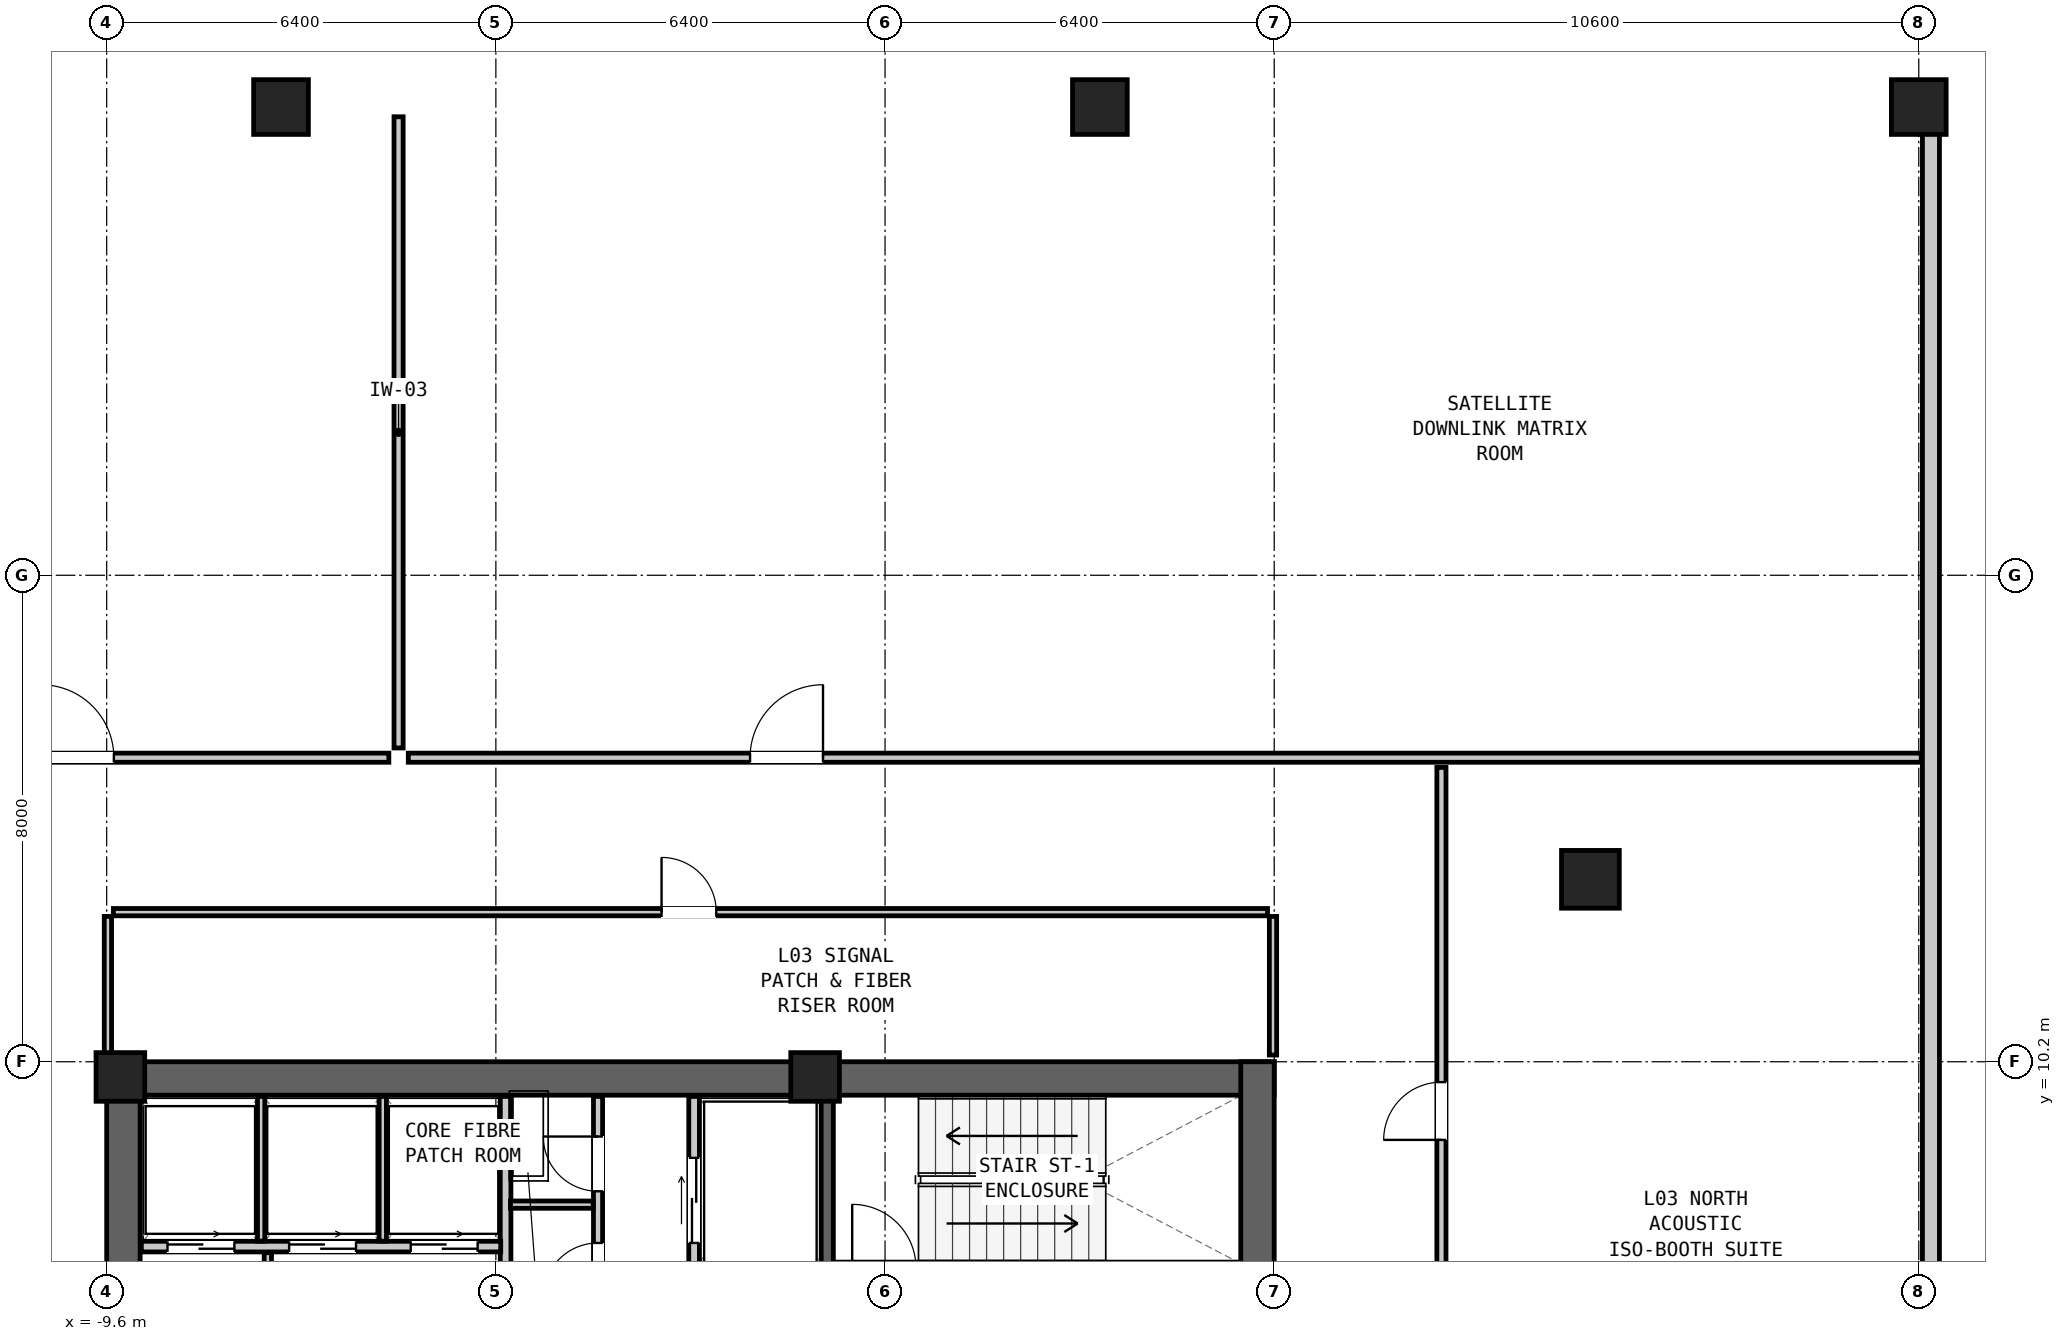
"""IFC4 building model, lengths in metres.
Left out: names, types, materials, properties, quantities, classifications, styles, units other than length and angle.
Written with IfcOpenShell. Run it as: python <this file> out.ifc"""

import sys

from ifc_helpers import new_model, si_unit, direction, frame, frame_2d, origin, origin_2d, place, context, subcontext, project, spatial, rectangle, hollow_rectangle, extrude, element, fill, save


model = new_model("IFC4")
c1 = context("Model", 3, precision=1e-05, world=origin(), true_north=direction((0.0, 1.0)))
c2 = subcontext(c1, "Body", "Model", "MODEL_VIEW")
j1 = project(units=[si_unit("LENGTHUNIT", "METRE"), si_unit("PLANEANGLEUNIT", "RADIAN")], contexts=[c1])
p1 = place(None, origin())
s1 = spatial("IfcSite", under=j1, at=p1, CompositionType="ELEMENT")
p2 = place(p1, origin())
s2 = spatial("IfcBuilding", under=s1, at=p2, CompositionType="ELEMENT")
p3 = place(p2, frame((0.0, 0.0, 13.5)))
s3 = spatial("IfcBuildingStorey", under=s2, at=p3, CompositionType="ELEMENT", Elevation=13.5)
p4 = place(p3, frame((-9.6, 9.925, 0.0), z_axis=(0.0, 0.0, 1.0), x_axis=(1.0, 0.0, 0.0)))
e1 = element("IfcWall", 1, at=p4, inside=s3, PredefinedType="SHEAR", context=c2, shape_type="SweptSolid", body=[
    extrude(rectangle(XDim=19.2, YDim=0.55, at=frame_2d((9.6, 0.0))), origin(), (0.0, 0.0, 1.0), 4.2),
])
for number, where, z_axis, x_axis in (
    (2, (-9.325, 3.6, 0.0), (0.0, 0.0, 1.0), (0.0, 1.0, 0.0)),
    (3, (9.325, 3.6, 0.0), (0.0, 0.0, 1.0), (0.0, 1.0, 0.0)),
):
    element("IfcWall", number, at=place(p3, frame(where, z_axis=z_axis, x_axis=x_axis)), inside=s3, PredefinedType="SHEAR", context=c2, shape_type="SweptSolid", body=[
        extrude(rectangle(XDim=6.6, YDim=0.55, at=frame_2d((3.3, 0.0))), origin(), (0.0, 0.0, 1.0), 4.2),
    ])
p5 = place(p3, frame((14.8, 13.2, 0.0), z_axis=(0.0, 0.0, 1.0), x_axis=(1.0, 0.0, 0.0)))
e4 = element("IfcColumn", 4, at=p5, inside=s3, PredefinedType="COLUMN", context=c2, shape_type="SweptSolid", body=[
    extrude(hollow_rectangle(XDim=0.95, YDim=0.95, WallThickness=0.06, at=origin_2d()), origin(), (0.0, 0.0, 1.0), 4.2),
])
for number, where, z_axis, x_axis in (
    (5, (20.2, 25.9, 0.0), (0.0, 0.0, 1.0), (1.0, 0.0, 0.0)),
    (6, (6.733, 25.9, 0.0), (0.0, 0.0, 1.0), (1.0, 0.0, 0.0)),
    (7, (-6.733, 25.9, 0.0), (0.0, 0.0, 1.0), (1.0, 0.0, 0.0)),
):
    element("IfcColumn", number, at=place(p3, frame(where, z_axis=z_axis, x_axis=x_axis)), inside=s3, PredefinedType="COLUMN", context=c2, shape_type="SweptSolid", body=[
        extrude(hollow_rectangle(XDim=0.9, YDim=0.9, WallThickness=0.055, at=origin_2d()), origin(), (0.0, 0.0, 1.0), 4.2),
    ])
for number, where, z_axis, x_axis in (
    (8, (-9.375, 9.95, 0.0), (0.0, 0.0, 1.0), (1.0, 0.0, 0.0)),
    (9, (2.05, 9.95, 0.0), (0.0, 0.0, 1.0), (1.0, 0.0, 0.0)),
):
    element("IfcColumn", number, at=place(p3, frame(where, z_axis=z_axis, x_axis=x_axis)), inside=s3, PredefinedType="COLUMN", context=c2, shape_type="SweptSolid", body=[
        extrude(rectangle(XDim=0.8, YDim=0.8, at=origin_2d()), origin(), (0.0, 0.0, 1.0), 4.2),
    ])
p6 = place(p3, frame((2.25, 4.17, 0.0), z_axis=(0.0, 0.0, 1.0), x_axis=(0.0, 1.0, 0.0)))
e10 = element("IfcWall", 10, at=p6, inside=s3, PredefinedType="SHEAR", context=c2, shape_type="SweptSolid", body=[
    extrude(rectangle(XDim=5.46, YDim=0.2, at=frame_2d((2.73, 0.0))), origin(), (0.0, 0.0, 1.0), 3.88),
])
p7 = place(p6, frame((0.65, 0.0, 0.0)))
e11 = element("IfcOpeningElement", 11, at=p7, cuts=e10, PredefinedType="OPENING", context=c2, shape_type="SweptSolid", body=[
    extrude(rectangle(XDim=1.15, YDim=2.08, at=frame_2d((0.575, 1.04))), frame((0.0, 0.112, 0.0), z_axis=(0.0, -1.0, 0.0), x_axis=(1.0, 0.0, 0.0)), (0.0, 0.0, 1.0), 0.224),
])
p8 = place(p3, frame((0.06, 4.17, 0.0), z_axis=(0.0, 0.0, 1.0), x_axis=(0.0, 1.0, 0.0)))
e12 = element("IfcWall", 12, at=p8, inside=s3, PredefinedType="PARTITIONING", context=c2, shape_type="SweptSolid", body=[
    extrude(rectangle(XDim=5.46, YDim=0.175, at=frame_2d((2.73, 0.0))), origin(), (0.0, 0.0, 1.0), 3.88),
])
p9 = place(p8, frame((3.05, 0.0, 0.0)))
e13 = element("IfcOpeningElement", 13, at=p9, cuts=e12, PredefinedType="OPENING", context=c2, shape_type="SweptSolid", body=[
    extrude(rectangle(XDim=1.4, YDim=2.12, at=frame_2d((0.7, 1.06))), frame((0.0, 0.1, 0.0), z_axis=(0.0, -1.0, 0.0), x_axis=(1.0, 0.0, 0.0)), (0.0, 0.0, 1.0), 0.199),
])
p10 = place(p3, frame((-3.04, 4.17, 0.0), z_axis=(0.0, 0.0, 1.0), x_axis=(0.0, 1.0, 0.0)))
e14 = element("IfcWall", 14, at=p10, inside=s3, PredefinedType="PARTITIONING", context=c2, shape_type="SweptSolid", body=[
    extrude(rectangle(XDim=5.46, YDim=0.175, at=frame_2d((2.73, 0.0))), origin(), (0.0, 0.0, 1.0), 3.88),
])
p11 = place(p3, frame((-1.52, 4.17, 0.0), z_axis=(0.0, 0.0, 1.0), x_axis=(0.0, 1.0, 0.0)))
e15 = element("IfcWall", 15, at=p11, inside=s3, PredefinedType="PARTITIONING", context=c2, shape_type="SweptSolid", body=[
    extrude(rectangle(XDim=5.46, YDim=0.15, at=frame_2d((2.73, 0.0))), origin(), (0.0, 0.0, 1.0), 3.88),
])
p12 = place(p11, frame((3.9, 0.0, 0.0)))
e16 = element("IfcOpeningElement", 16, at=p12, cuts=e15, PredefinedType="OPENING", context=c2, shape_type="SweptSolid", body=[
    extrude(rectangle(XDim=0.9, YDim=2.05, at=frame_2d((0.45, 1.025))), frame((0.0, 0.087, 0.0), z_axis=(0.0, -1.0, 0.0), x_axis=(1.0, 0.0, 0.0)), (0.0, 0.0, 1.0), 0.174),
])
p13 = place(p11, frame((2.15, 0.0, 0.0)))
e17 = element("IfcOpeningElement", 17, at=p13, cuts=e15, PredefinedType="OPENING", context=c2, shape_type="SweptSolid", body=[
    extrude(rectangle(XDim=0.9, YDim=2.05, at=frame_2d((0.45, 1.025))), frame((0.0, 0.087, 0.0), z_axis=(0.0, -1.0, 0.0), x_axis=(1.0, 0.0, 0.0)), (0.0, 0.0, 1.0), 0.174),
])
p14 = place(p11, frame((0.35, 0.0, 0.0)))
e18 = element("IfcOpeningElement", 18, at=p14, cuts=e15, PredefinedType="OPENING", context=c2, shape_type="SweptSolid", body=[
    extrude(rectangle(XDim=0.92, YDim=2.1, at=frame_2d((0.46, 1.05))), frame((0.0, 0.087, 0.0), z_axis=(0.0, -1.0, 0.0), x_axis=(1.0, 0.0, 0.0)), (0.0, 0.0, 1.0), 0.174),
])
p15 = place(p3, frame((-2.96, 7.85, 0.0), z_axis=(0.0, 0.0, 1.0), x_axis=(1.0, 0.0, 0.0)))
e19 = element("IfcWall", 19, at=p15, inside=s3, PredefinedType="PARTITIONING", context=c2, shape_type="SweptSolid", body=[
    extrude(rectangle(XDim=1.36, YDim=0.12, at=frame_2d((0.68, 0.0))), origin(), (0.0, 0.0, 1.0), 3.88),
])
p16 = place(p3, frame((-9.03, 7.16, 0.0), z_axis=(0.0, 0.0, 1.0), x_axis=(1.0, 0.0, 0.0)))
e20 = element("IfcWall", 20, at=p16, inside=s3, PredefinedType="PARTITIONING", context=c2, shape_type="SweptSolid", body=[
    extrude(rectangle(XDim=5.91, YDim=0.175, at=frame_2d((2.955, 0.0))), origin(), (0.0, 0.0, 1.0), 3.88),
])
p17 = place(p16, frame((0.43, 0.0, 0.0)))
e21 = element("IfcOpeningElement", 21, at=p17, cuts=e20, PredefinedType="OPENING", context=c2, shape_type="SweptSolid", body=[
    extrude(rectangle(XDim=1.1, YDim=2.06, at=frame_2d((0.55, 1.03))), frame((0.0, 0.1, 0.0), z_axis=(0.0, -1.0, 0.0), x_axis=(1.0, 0.0, 0.0)), (0.0, 0.0, 1.0), 0.199),
])
p18 = place(p16, frame((2.43, 0.0, 0.0)))
e22 = element("IfcOpeningElement", 22, at=p18, cuts=e20, PredefinedType="OPENING", context=c2, shape_type="SweptSolid", body=[
    extrude(rectangle(XDim=1.1, YDim=2.06, at=frame_2d((0.55, 1.03))), frame((0.0, 0.1, 0.0), z_axis=(0.0, -1.0, 0.0), x_axis=(1.0, 0.0, 0.0)), (0.0, 0.0, 1.0), 0.199),
])
p19 = place(p16, frame((4.43, 0.0, 0.0)))
e23 = element("IfcOpeningElement", 23, at=p19, cuts=e20, PredefinedType="OPENING", context=c2, shape_type="SweptSolid", body=[
    extrude(rectangle(XDim=1.1, YDim=2.06, at=frame_2d((0.55, 1.03))), frame((0.0, 0.1, 0.0), z_axis=(0.0, -1.0, 0.0), x_axis=(1.0, 0.0, 0.0)), (0.0, 0.0, 1.0), 0.199),
])
for number, where, z_axis, x_axis in (
    (24, (-7.06, 7.25, 0.0), (0.0, 0.0, 1.0), (0.0, 1.0, 0.0)),
    (25, (-5.06, 7.25, 0.0), (0.0, 0.0, 1.0), (0.0, 1.0, 0.0)),
):
    element("IfcWall", number, at=place(p3, frame(where, z_axis=z_axis, x_axis=x_axis)), inside=s3, PredefinedType="PARTITIONING", context=c2, shape_type="SweptSolid", body=[
        extrude(rectangle(XDim=2.38, YDim=0.12, at=frame_2d((1.19, 0.0))), origin(), (0.0, 0.0, 1.0), 3.88),
    ])
p20 = place(p3, frame((-6.95, 4.17, 0.0), z_axis=(0.0, 0.0, 1.0), x_axis=(0.0, 1.0, 0.0)))
e26 = element("IfcWall", 26, at=p20, inside=s3, PredefinedType="PARTITIONING", context=c2, shape_type="SweptSolid", body=[
    extrude(rectangle(XDim=2.89, YDim=0.12, at=frame_2d((1.445, 0.0))), origin(), (0.0, 0.0, 1.0), 3.88),
])
p21 = place(p3, frame((20.4, -25.74, 0.0), z_axis=(0.0, 0.0, 1.0), x_axis=(0.0, 1.0, 0.0)))
e27 = element("IfcWall", 27, at=p21, inside=s3, PredefinedType="MOVABLE", context=c2, shape_type="SweptSolid", body=[
    extrude(rectangle(XDim=51.48, YDim=0.28, at=frame_2d((25.74, 0.0))), origin(), (0.0, 0.0, 1.0), 3.253),
])
p22 = place(p21, frame((25.255, 0.0, 0.0)))
e28 = element("IfcOpeningElement", 28, at=p22, cuts=e27, PredefinedType="OPENING", context=c2, shape_type="SweptSolid", body=[
    extrude(rectangle(XDim=2.0, YDim=2.14, at=frame_2d((1.0, 1.07))), frame((0.0, 0.152, 0.0), z_axis=(0.0, -1.0, 0.0), x_axis=(1.0, 0.0, 0.0)), (0.0, 0.0, 1.0), 0.304),
])
p23 = place(p3, frame((-28.24, 15.2, 0.0), z_axis=(0.0, 0.0, 1.0), x_axis=(1.0, 0.0, 0.0)))
e29 = element("IfcWall", 29, at=p23, inside=s3, PredefinedType="PARTITIONING", context=c2, shape_type="SweptSolid", body=[
    extrude(rectangle(XDim=23.28, YDim=0.15, at=frame_2d((11.64, 0.0))), origin(), (0.0, 0.0, 1.0), 3.88),
])
p24 = place(p23, frame((17.558, 0.0, 0.0)))
e30 = element("IfcOpeningElement", 30, at=p24, cuts=e29, PredefinedType="OPENING", context=c2, shape_type="SweptSolid", body=[
    extrude(rectangle(XDim=1.2, YDim=2.1, at=frame_2d((0.6, 1.05))), frame((0.0, 0.087, 0.0), z_axis=(0.0, -1.0, 0.0), x_axis=(1.0, 0.0, 0.0)), (0.0, 0.0, 1.0), 0.174),
])
p25 = place(p3, frame((-4.64, 15.2, 0.0), z_axis=(0.0, 0.0, 1.0), x_axis=(1.0, 0.0, 0.0)))
e31 = element("IfcWall", 31, at=p25, inside=s3, PredefinedType="PARTITIONING", context=c2, shape_type="SweptSolid", body=[
    extrude(rectangle(XDim=24.88, YDim=0.15, at=frame_2d((12.44, 0.0))), origin(), (0.0, 0.0, 1.0), 3.88),
])
p26 = place(p25, frame((5.62, 0.0, 0.0)))
e32 = element("IfcOpeningElement", 32, at=p26, cuts=e31, PredefinedType="OPENING", context=c2, shape_type="SweptSolid", body=[
    extrude(rectangle(XDim=1.2, YDim=2.1, at=frame_2d((0.6, 1.05))), frame((0.0, 0.087, 0.0), z_axis=(0.0, -1.0, 0.0), x_axis=(1.0, 0.0, 0.0)), (0.0, 0.0, 1.0), 0.174),
])
p27 = place(p3, frame((-4.8, 15.36, 0.0), z_axis=(0.0, 0.0, 1.0), x_axis=(0.0, 1.0, 0.0)))
e33 = element("IfcWall", 33, at=p27, inside=s3, PredefinedType="PARTITIONING", context=c2, shape_type="SweptSolid", body=[
    extrude(rectangle(XDim=10.38, YDim=0.15, at=frame_2d((5.19, 0.0))), origin(), (0.0, 0.0, 1.0), 3.88),
])
p28 = place(p3, frame((12.35, 3.74, 0.0), z_axis=(0.0, 0.0, 1.0), x_axis=(0.0, 1.0, 0.0)))
e34 = element("IfcWall", 34, at=p28, inside=s3, PredefinedType="PARTITIONING", context=c2, shape_type="SweptSolid", body=[
    extrude(rectangle(XDim=11.3, YDim=0.15, at=frame_2d((5.65, 0.0))), origin(), (0.0, 0.0, 1.0), 3.88),
])
p29 = place(p28, frame((5.175, 0.0, 0.0)))
e35 = element("IfcOpeningElement", 35, at=p29, cuts=e34, PredefinedType="OPENING", context=c2, shape_type="SweptSolid", body=[
    extrude(rectangle(XDim=0.95, YDim=2.1, at=frame_2d((0.475, 1.05))), frame((0.0, 0.087, 0.0), z_axis=(0.0, -1.0, 0.0), x_axis=(1.0, 0.0, 0.0)), (0.0, 0.0, 1.0), 0.174),
])
p30 = place(p3, frame((-9.49, 12.66, 0.0), z_axis=(0.0, 0.0, 1.0), x_axis=(1.0, 0.0, 0.0)))
e36 = element("IfcWall", 36, at=p30, inside=s3, PredefinedType="PARTITIONING", context=c2, shape_type="SweptSolid", body=[
    extrude(rectangle(XDim=18.98, YDim=0.12, at=frame_2d((9.49, 0.0))), origin(), (0.0, 0.0, 1.0), 3.88),
])
p31 = place(p30, frame((9.015, 0.0, 0.0)))
e37 = element("IfcOpeningElement", 37, at=p31, cuts=e36, PredefinedType="OPENING", context=c2, shape_type="SweptSolid", body=[
    extrude(rectangle(XDim=0.9, YDim=2.05, at=frame_2d((0.45, 1.025))), frame((0.0, 0.072, 0.0), z_axis=(0.0, -1.0, 0.0), x_axis=(1.0, 0.0, 0.0)), (0.0, 0.0, 1.0), 0.144),
])
for number, where, z_axis, x_axis in (
    (38, (-9.58, 10.31, 0.0), (0.0, 0.0, 1.0), (0.0, 1.0, 0.0)),
    (39, (9.58, 10.31, 0.0), (0.0, 0.0, 1.0), (0.0, 1.0, 0.0)),
):
    element("IfcWall", number, at=place(p3, frame(where, z_axis=z_axis, x_axis=x_axis)), inside=s3, PredefinedType="PARTITIONING", context=c2, shape_type="SweptSolid", body=[
        extrude(rectangle(XDim=2.28, YDim=0.12, at=frame_2d((1.14, 0.0))), origin(), (0.0, 0.0, 1.0), 3.88),
    ])
p32 = place(p9, origin())
e40 = element("IfcDoor", 40, at=p32, inside=s3, OperationType="DOUBLE_DOOR_SLIDING", PredefinedType="DOOR", context=c2, shape_type="SweptSolid", body=[
    extrude(rectangle(XDim=1.4, YDim=2.12, at=frame_2d((0.7, 1.06))), frame((0.0, 0.025, 0.0), z_axis=(0.0, -1.0, 0.0), x_axis=(1.0, 0.0, 0.0)), (0.0, 0.0, 1.0), 0.05),
])
fill(e13, e40)
p33 = place(p12, origin())
e41 = element("IfcDoor", 41, at=p33, inside=s3, OperationType="SINGLE_SWING_RIGHT", PredefinedType="DOOR", context=c2, shape_type="SweptSolid", body=[
    extrude(rectangle(XDim=0.9, YDim=2.05, at=frame_2d((0.45, 1.025))), frame((0.0, 0.025, 0.0), z_axis=(0.0, -1.0, 0.0), x_axis=(1.0, 0.0, 0.0)), (0.0, 0.0, 1.0), 0.05),
])
fill(e16, e41)
p34 = place(p13, origin())
e42 = element("IfcDoor", 42, at=p34, inside=s3, OperationType="SINGLE_SWING_LEFT", PredefinedType="DOOR", context=c2, shape_type="SweptSolid", body=[
    extrude(rectangle(XDim=0.9, YDim=2.05, at=frame_2d((0.45, 1.025))), frame((0.0, 0.025, 0.0), z_axis=(0.0, -1.0, 0.0), x_axis=(1.0, 0.0, 0.0)), (0.0, 0.0, 1.0), 0.05),
])
fill(e17, e42)
p35 = place(p17, origin())
e43 = element("IfcDoor", 43, at=p35, inside=s3, OperationType="DOUBLE_DOOR_SLIDING", PredefinedType="DOOR", context=c2, shape_type="SweptSolid", body=[
    extrude(rectangle(XDim=1.1, YDim=2.06, at=frame_2d((0.55, 1.03))), frame((0.0, 0.025, 0.0), z_axis=(0.0, -1.0, 0.0), x_axis=(1.0, 0.0, 0.0)), (0.0, 0.0, 1.0), 0.05),
])
fill(e21, e43)
p36 = place(p18, origin())
e44 = element("IfcDoor", 44, at=p36, inside=s3, OperationType="DOUBLE_DOOR_SLIDING", PredefinedType="DOOR", context=c2, shape_type="SweptSolid", body=[
    extrude(rectangle(XDim=1.1, YDim=2.06, at=frame_2d((0.55, 1.03))), frame((0.0, 0.025, 0.0), z_axis=(0.0, -1.0, 0.0), x_axis=(1.0, 0.0, 0.0)), (0.0, 0.0, 1.0), 0.05),
])
fill(e22, e44)
p37 = place(p19, origin())
e45 = element("IfcDoor", 45, at=p37, inside=s3, OperationType="DOUBLE_DOOR_SLIDING", PredefinedType="DOOR", context=c2, shape_type="SweptSolid", body=[
    extrude(rectangle(XDim=1.1, YDim=2.06, at=frame_2d((0.55, 1.03))), frame((0.0, 0.025, 0.0), z_axis=(0.0, -1.0, 0.0), x_axis=(1.0, 0.0, 0.0)), (0.0, 0.0, 1.0), 0.05),
])
fill(e23, e45)
p38 = place(p24, origin())
e46 = element("IfcDoor", 46, at=p38, inside=s3, OperationType="SINGLE_SWING_LEFT", PredefinedType="DOOR", context=c2, shape_type="SweptSolid", body=[
    extrude(rectangle(XDim=1.2, YDim=2.1, at=frame_2d((0.6, 1.05))), frame((0.0, 0.025, 0.0), z_axis=(0.0, -1.0, 0.0), x_axis=(1.0, 0.0, 0.0)), (0.0, 0.0, 1.0), 0.05),
])
fill(e30, e46)
p39 = place(p26, origin())
e47 = element("IfcDoor", 47, at=p39, inside=s3, OperationType="SINGLE_SWING_RIGHT", PredefinedType="DOOR", context=c2, shape_type="SweptSolid", body=[
    extrude(rectangle(XDim=1.2, YDim=2.1, at=frame_2d((0.6, 1.05))), frame((0.0, 0.025, 0.0), z_axis=(0.0, -1.0, 0.0), x_axis=(1.0, 0.0, 0.0)), (0.0, 0.0, 1.0), 0.05),
])
fill(e32, e47)
p40 = place(p29, origin())
e48 = element("IfcDoor", 48, at=p40, inside=s3, OperationType="SINGLE_SWING_LEFT", PredefinedType="DOOR", context=c2, shape_type="SweptSolid", body=[
    extrude(rectangle(XDim=0.95, YDim=2.1, at=frame_2d((0.475, 1.05))), frame((0.0, 0.025, 0.0), z_axis=(0.0, -1.0, 0.0), x_axis=(1.0, 0.0, 0.0)), (0.0, 0.0, 1.0), 0.05),
])
fill(e35, e48)
p41 = place(p31, origin())
e49 = element("IfcDoor", 49, at=p41, inside=s3, OperationType="SINGLE_SWING_LEFT", PredefinedType="DOOR", context=c2, shape_type="SweptSolid", body=[
    extrude(rectangle(XDim=0.9, YDim=2.05, at=frame_2d((0.45, 1.025))), frame((0.0, 0.025, 0.0), z_axis=(0.0, -1.0, 0.0), x_axis=(1.0, 0.0, 0.0)), (0.0, 0.0, 1.0), 0.05),
])
fill(e37, e49)
save(model, sys.argv[1])
